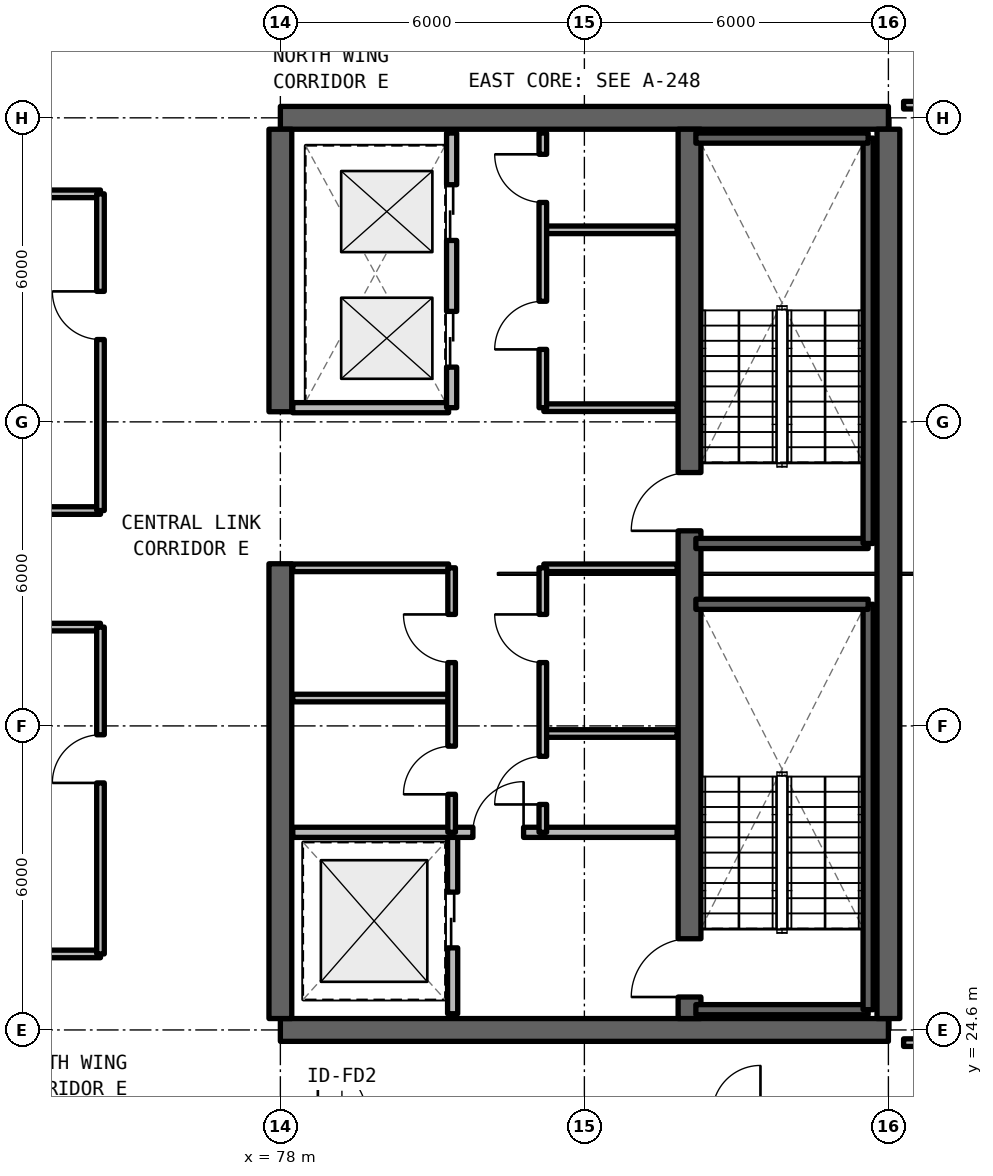
"""IFC4 building model, lengths in metres.
Left out: names, types, materials, properties, quantities, classifications, styles, units other than length and angle.
Written with IfcOpenShell. Run it as: python <this file> out.ifc"""

import sys

from ifc_helpers import new_model, si_unit, direction, frame, frame_2d, origin, place, context, subcontext, project, spatial, rectangle, extrude, element, fill, save


model = new_model("IFC4")
c1 = context("Model", 3, precision=1e-05, world=origin(), true_north=direction((0.0, 1.0)))
c2 = subcontext(c1, "Body", "Model", "MODEL_VIEW")
j1 = project(units=[si_unit("LENGTHUNIT", "METRE"), si_unit("PLANEANGLEUNIT", "RADIAN")], contexts=[c1])
p1 = place(None, origin())
s1 = spatial("IfcSite", under=j1, at=p1, CompositionType="ELEMENT")
p2 = place(p1, origin())
s2 = spatial("IfcBuilding", under=s1, at=p2, CompositionType="ELEMENT")
p3 = place(p2, frame((0.0, 0.0, 249.81)))
s3 = spatial("IfcBuildingStorey", under=s2, at=p3, CompositionType="ELEMENT", Elevation=249.81)
for number, where, z_axis, x_axis in (
    (1, (78.0, 24.6, 0.0), (0.0, 0.0, 1.0), (1.0, 0.0, 0.0)),
    (2, (90.0, 42.6, 0.0), (0.0, 0.0, 1.0), (-1.0, 0.0, 0.0)),
):
    element("IfcWall", number, at=place(p3, frame(where, z_axis=z_axis, x_axis=x_axis)), inside=s3, PredefinedType="SHEAR", context=c2, shape_type="SweptSolid", body=[
        extrude(rectangle(XDim=12.0, YDim=0.45, at=frame_2d((6.0, 0.0))), origin(), (0.0, 0.0, 1.0), 3.63),
    ])
p4 = place(p3, frame((90.0, 24.825, 0.0), z_axis=(0.0, 0.0, 1.0), x_axis=(0.0, 1.0, 0.0)))
e3 = element("IfcWall", 3, at=p4, inside=s3, PredefinedType="SHEAR", context=c2, shape_type="SweptSolid", body=[
    extrude(rectangle(XDim=17.55, YDim=0.45, at=frame_2d((8.775, 0.0))), origin(), (0.0, 0.0, 1.0), 3.63),
])
p5 = place(p3, frame((78.0, 24.825, 0.0), z_axis=(0.0, 0.0, 1.0), x_axis=(0.0, 1.0, 0.0)))
e4 = element("IfcWall", 4, at=p5, inside=s3, PredefinedType="SHEAR", context=c2, shape_type="SweptSolid", body=[
    extrude(rectangle(XDim=8.975, YDim=0.45, at=frame_2d((4.488, 0.0))), origin(), (0.0, 0.0, 1.0), 3.63),
])
p6 = place(p3, frame((78.0, 36.8, 0.0), z_axis=(0.0, 0.0, 1.0), x_axis=(0.0, 1.0, 0.0)))
e5 = element("IfcWall", 5, at=p6, inside=s3, PredefinedType="SHEAR", context=c2, shape_type="SweptSolid", body=[
    extrude(rectangle(XDim=5.575, YDim=0.45, at=frame_2d((2.788, 0.0))), origin(), (0.0, 0.0, 1.0), 3.63),
])
p7 = place(p3, frame((86.075, 24.825, 0.0), z_axis=(0.0, 0.0, 1.0), x_axis=(0.0, 1.0, 0.0)))
e6 = element("IfcWall", 6, at=p7, inside=s3, PredefinedType="SHEAR", context=c2, shape_type="SweptSolid", body=[
    extrude(rectangle(XDim=17.55, YDim=0.45, at=frame_2d((8.775, 0.0))), origin(), (0.0, 0.0, 1.0), 3.63),
])
p8 = place(p7, frame((0.425, 0.0, 0.0)))
e7 = element("IfcOpeningElement", 7, at=p8, cuts=e6, PredefinedType="OPENING", context=c2, shape_type="SweptSolid", body=[
    extrude(rectangle(XDim=1.15, YDim=2.15, at=frame_2d((0.575, 1.075))), frame((0.0, 0.235, 0.0), z_axis=(0.0, -1.0, 0.0), x_axis=(1.0, 0.0, 0.0)), (0.0, 0.0, 1.0), 0.47),
])
p9 = place(p7, frame((9.625, 0.0, 0.0)))
e8 = element("IfcOpeningElement", 8, at=p9, cuts=e6, PredefinedType="OPENING", context=c2, shape_type="SweptSolid", body=[
    extrude(rectangle(XDim=1.15, YDim=2.15, at=frame_2d((0.575, 1.075))), frame((0.0, 0.235, 0.0), z_axis=(0.0, -1.0, 0.0), x_axis=(1.0, 0.0, 0.0)), (0.0, 0.0, 1.0), 0.47),
])
p10 = place(p3, frame((81.4, 24.92, 0.0), z_axis=(0.0, 0.0, 1.0), x_axis=(0.0, 1.0, 0.0)))
e9 = element("IfcWall", 9, at=p10, inside=s3, PredefinedType="SOLIDWALL", context=c2, shape_type="SweptSolid", body=[
    extrude(rectangle(XDim=3.58, YDim=0.2, at=frame_2d((1.79, 0.0))), origin(), (0.0, 0.0, 1.0), 2.63),
])
p11 = place(p10, frame((1.3, 0.0, 0.0)))
e10 = element("IfcOpeningElement", 10, at=p11, cuts=e9, PredefinedType="OPENING", context=c2, shape_type="SweptSolid", body=[
    extrude(rectangle(XDim=1.1, YDim=2.2, at=frame_2d((0.55, 1.1))), frame((0.0, 0.11, 0.0), z_axis=(0.0, -1.0, 0.0), x_axis=(1.0, 0.0, 0.0)), (0.0, 0.0, 1.0), 0.22),
])
p12 = place(p3, frame((78.245, 28.5, 0.0), z_axis=(0.0, 0.0, 1.0), x_axis=(1.0, 0.0, 0.0)))
e11 = element("IfcWall", 11, at=p12, inside=s3, PredefinedType="SOLIDWALL", context=c2, shape_type="SweptSolid", body=[
    extrude(rectangle(XDim=7.585, YDim=0.2, at=frame_2d((3.792, 0.0))), origin(), (0.0, 0.0, 1.0), 2.63),
])
p13 = place(p12, frame((3.555, 0.0, 0.0)))
e12 = element("IfcOpeningElement", 12, at=p13, cuts=e11, PredefinedType="OPENING", context=c2, shape_type="SweptSolid", body=[
    extrude(rectangle(XDim=1.0, YDim=2.15, at=frame_2d((0.5, 1.075))), frame((0.0, 0.11, 0.0), z_axis=(0.0, -1.0, 0.0), x_axis=(1.0, 0.0, 0.0)), (0.0, 0.0, 1.0), 0.22),
])
for number, where, z_axis, x_axis in (
    (13, (83.2, 30.45, 0.0), (0.0, 0.0, 1.0), (1.0, 0.0, 0.0)),
    (14, (83.2, 33.72, 0.0), (0.0, 0.0, 1.0), (1.0, 0.0, 0.0)),
):
    element("IfcWall", number, at=place(p3, frame(where, z_axis=z_axis, x_axis=x_axis)), inside=s3, PredefinedType="SOLIDWALL", context=c2, shape_type="SweptSolid", body=[
        extrude(rectangle(XDim=2.63, YDim=0.15, at=frame_2d((1.315, 0.0))), origin(), (0.0, 0.0, 1.0), 2.63),
    ])
p14 = place(p3, frame((83.18, 28.5, 0.0), z_axis=(0.0, 0.0, 1.0), x_axis=(0.0, 1.0, 0.0)))
e15 = element("IfcWall", 15, at=p14, inside=s3, PredefinedType="SOLIDWALL", context=c2, shape_type="SweptSolid", body=[
    extrude(rectangle(XDim=5.22, YDim=0.15, at=frame_2d((2.61, 0.0))), origin(), (0.0, 0.0, 1.0), 2.63),
])
p15 = place(p14, frame((0.55, 0.0, 0.0)))
e16 = element("IfcOpeningElement", 16, at=p15, cuts=e15, PredefinedType="OPENING", context=c2, shape_type="SweptSolid", body=[
    extrude(rectangle(XDim=0.95, YDim=2.15, at=frame_2d((0.475, 1.075))), frame((0.0, 0.085, 0.0), z_axis=(0.0, -1.0, 0.0), x_axis=(1.0, 0.0, 0.0)), (0.0, 0.0, 1.0), 0.17),
])
p16 = place(p14, frame((3.35, 0.0, 0.0)))
e17 = element("IfcOpeningElement", 17, at=p16, cuts=e15, PredefinedType="OPENING", context=c2, shape_type="SweptSolid", body=[
    extrude(rectangle(XDim=0.95, YDim=2.15, at=frame_2d((0.475, 1.075))), frame((0.0, 0.085, 0.0), z_axis=(0.0, -1.0, 0.0), x_axis=(1.0, 0.0, 0.0)), (0.0, 0.0, 1.0), 0.17),
])
for number, where, z_axis, x_axis in (
    (18, (78.245, 31.15, 0.0), (0.0, 0.0, 1.0), (1.0, 0.0, 0.0)),
    (19, (78.245, 33.72, 0.0), (0.0, 0.0, 1.0), (1.0, 0.0, 0.0)),
):
    element("IfcWall", number, at=place(p3, frame(where, z_axis=z_axis, x_axis=x_axis)), inside=s3, PredefinedType="SOLIDWALL", context=c2, shape_type="SweptSolid", body=[
        extrude(rectangle(XDim=3.075, YDim=0.15, at=frame_2d((1.538, 0.0))), origin(), (0.0, 0.0, 1.0), 2.63),
    ])
p17 = place(p3, frame((81.38, 28.5, 0.0), z_axis=(0.0, 0.0, 1.0), x_axis=(0.0, 1.0, 0.0)))
e20 = element("IfcWall", 20, at=p17, inside=s3, PredefinedType="SOLIDWALL", context=c2, shape_type="SweptSolid", body=[
    extrude(rectangle(XDim=5.22, YDim=0.15, at=frame_2d((2.61, 0.0))), origin(), (0.0, 0.0, 1.0), 2.63),
])
p18 = place(p17, frame((0.75, 0.0, 0.0)))
e21 = element("IfcOpeningElement", 21, at=p18, cuts=e20, PredefinedType="OPENING", context=c2, shape_type="SweptSolid", body=[
    extrude(rectangle(XDim=0.95, YDim=2.15, at=frame_2d((0.475, 1.075))), frame((0.0, 0.085, 0.0), z_axis=(0.0, -1.0, 0.0), x_axis=(1.0, 0.0, 0.0)), (0.0, 0.0, 1.0), 0.17),
])
p19 = place(p17, frame((3.35, 0.0, 0.0)))
e22 = element("IfcOpeningElement", 22, at=p19, cuts=e20, PredefinedType="OPENING", context=c2, shape_type="SweptSolid", body=[
    extrude(rectangle(XDim=0.95, YDim=2.15, at=frame_2d((0.475, 1.075))), frame((0.0, 0.085, 0.0), z_axis=(0.0, -1.0, 0.0), x_axis=(1.0, 0.0, 0.0)), (0.0, 0.0, 1.0), 0.17),
])
for number, where, z_axis, x_axis in (
    (23, (83.2, 36.88, 0.0), (0.0, 0.0, 1.0), (1.0, 0.0, 0.0)),
    (24, (83.2, 40.39, 0.0), (0.0, 0.0, 1.0), (1.0, 0.0, 0.0)),
):
    element("IfcWall", number, at=place(p3, frame(where, z_axis=z_axis, x_axis=x_axis)), inside=s3, PredefinedType="SOLIDWALL", context=c2, shape_type="SweptSolid", body=[
        extrude(rectangle(XDim=2.63, YDim=0.15, at=frame_2d((1.315, 0.0))), origin(), (0.0, 0.0, 1.0), 2.63),
    ])
p20 = place(p3, frame((83.18, 36.88, 0.0), z_axis=(0.0, 0.0, 1.0), x_axis=(0.0, 1.0, 0.0)))
e25 = element("IfcWall", 25, at=p20, inside=s3, PredefinedType="SOLIDWALL", context=c2, shape_type="SweptSolid", body=[
    extrude(rectangle(XDim=5.42, YDim=0.15, at=frame_2d((2.71, 0.0))), origin(), (0.0, 0.0, 1.0), 2.63),
])
p21 = place(p20, frame((1.15, 0.0, 0.0)))
e26 = element("IfcOpeningElement", 26, at=p21, cuts=e25, PredefinedType="OPENING", context=c2, shape_type="SweptSolid", body=[
    extrude(rectangle(XDim=0.95, YDim=2.15, at=frame_2d((0.475, 1.075))), frame((0.0, 0.085, 0.0), z_axis=(0.0, -1.0, 0.0), x_axis=(1.0, 0.0, 0.0)), (0.0, 0.0, 1.0), 0.17),
])
p22 = place(p20, frame((4.05, 0.0, 0.0)))
e27 = element("IfcOpeningElement", 27, at=p22, cuts=e25, PredefinedType="OPENING", context=c2, shape_type="SweptSolid", body=[
    extrude(rectangle(XDim=0.95, YDim=2.15, at=frame_2d((0.475, 1.075))), frame((0.0, 0.085, 0.0), z_axis=(0.0, -1.0, 0.0), x_axis=(1.0, 0.0, 0.0)), (0.0, 0.0, 1.0), 0.17),
])
p23 = place(p3, frame((78.245, 36.88, 0.0), z_axis=(0.0, 0.0, 1.0), x_axis=(1.0, 0.0, 0.0)))
e28 = element("IfcWall", 28, at=p23, inside=s3, PredefinedType="SOLIDWALL", context=c2, shape_type="SweptSolid", body=[
    extrude(rectangle(XDim=3.075, YDim=0.2, at=frame_2d((1.538, 0.0))), origin(), (0.0, 0.0, 1.0), 2.63),
])
p24 = place(p3, frame((81.38, 36.88, 0.0), z_axis=(0.0, 0.0, 1.0), x_axis=(0.0, 1.0, 0.0)))
e29 = element("IfcWall", 29, at=p24, inside=s3, PredefinedType="SOLIDWALL", context=c2, shape_type="SweptSolid", body=[
    extrude(rectangle(XDim=5.42, YDim=0.2, at=frame_2d((2.71, 0.0))), origin(), (0.0, 0.0, 1.0), 2.63),
])
p25 = place(p24, frame((0.8, 0.0, 0.0)))
e30 = element("IfcOpeningElement", 30, at=p25, cuts=e29, PredefinedType="OPENING", context=c2, shape_type="SweptSolid", body=[
    extrude(rectangle(XDim=1.1, YDim=2.2, at=frame_2d((0.55, 1.1))), frame((0.0, 0.11, 0.0), z_axis=(0.0, -1.0, 0.0), x_axis=(1.0, 0.0, 0.0)), (0.0, 0.0, 1.0), 0.22),
])
p26 = place(p24, frame((3.3, 0.0, 0.0)))
e31 = element("IfcOpeningElement", 31, at=p26, cuts=e29, PredefinedType="OPENING", context=c2, shape_type="SweptSolid", body=[
    extrude(rectangle(XDim=1.1, YDim=2.2, at=frame_2d((0.55, 1.1))), frame((0.0, 0.11, 0.0), z_axis=(0.0, -1.0, 0.0), x_axis=(1.0, 0.0, 0.0)), (0.0, 0.0, 1.0), 0.22),
])
p27 = place(p3, frame((90.3, 24.35, 0.0), z_axis=(0.0, 0.0, 1.0), x_axis=(1.0, 0.0, 0.0)))
e32 = element("IfcWall", 32, at=p27, inside=s3, PredefinedType="SOLIDWALL", context=c2, shape_type="SweptSolid", body=[
    extrude(rectangle(XDim=8.52, YDim=0.15, at=frame_2d((4.26, 0.0))), origin(), (0.0, 0.0, 1.0), 2.63),
])
p28 = place(p27, frame((0.975, 0.0, 0.0)))
e33 = element("IfcOpeningElement", 33, at=p28, cuts=e32, PredefinedType="OPENING", context=c2, shape_type="SweptSolid", body=[
    extrude(rectangle(XDim=0.95, YDim=2.15, at=frame_2d((0.475, 1.075))), frame((0.0, 0.085, 0.0), z_axis=(0.0, -1.0, 0.0), x_axis=(1.0, 0.0, 0.0)), (0.0, 0.0, 1.0), 0.17),
])
p29 = place(p3, frame((90.3, 42.85, 0.0), z_axis=(0.0, 0.0, 1.0), x_axis=(1.0, 0.0, 0.0)))
e34 = element("IfcWall", 34, at=p29, inside=s3, PredefinedType="SOLIDWALL", context=c2, shape_type="SweptSolid", body=[
    extrude(rectangle(XDim=8.52, YDim=0.15, at=frame_2d((4.26, 0.0))), origin(), (0.0, 0.0, 1.0), 2.63),
])
for number, where, z_axis, x_axis in (
    (35, (66.0, 26.1, 0.0), (0.0, 0.0, 1.0), (1.0, 0.0, 0.0)),
    (36, (66.0, 32.55, 0.0), (0.0, 0.0, 1.0), (1.0, 0.0, 0.0)),
):
    element("IfcWall", number, at=place(p3, frame(where, z_axis=z_axis, x_axis=x_axis)), inside=s3, PredefinedType="SOLIDWALL", context=c2, shape_type="SweptSolid", body=[
        extrude(rectangle(XDim=8.45, YDim=0.15, at=frame_2d((4.225, 0.0))), origin(), (0.0, 0.0, 1.0), 2.63),
    ])
p30 = place(p3, frame((74.45, 26.1, 0.0), z_axis=(0.0, 0.0, 1.0), x_axis=(0.0, 1.0, 0.0)))
e37 = element("IfcWall", 37, at=p30, inside=s3, PredefinedType="SOLIDWALL", context=c2, shape_type="SweptSolid", body=[
    extrude(rectangle(XDim=6.45, YDim=0.15, at=frame_2d((3.225, 0.0))), origin(), (0.0, 0.0, 1.0), 2.63),
])
p31 = place(p30, frame((3.375, 0.0, 0.0)))
e38 = element("IfcOpeningElement", 38, at=p31, cuts=e37, PredefinedType="OPENING", context=c2, shape_type="SweptSolid", body=[
    extrude(rectangle(XDim=0.95, YDim=2.15, at=frame_2d((0.475, 1.075))), frame((0.0, 0.085, 0.0), z_axis=(0.0, -1.0, 0.0), x_axis=(1.0, 0.0, 0.0)), (0.0, 0.0, 1.0), 0.17),
])
for number, where, z_axis, x_axis in (
    (39, (66.0, 34.85, 0.0), (0.0, 0.0, 1.0), (1.0, 0.0, 0.0)),
    (40, (66.0, 41.1, 0.0), (0.0, 0.0, 1.0), (1.0, 0.0, 0.0)),
):
    element("IfcWall", number, at=place(p3, frame(where, z_axis=z_axis, x_axis=x_axis)), inside=s3, PredefinedType="SOLIDWALL", context=c2, shape_type="SweptSolid", body=[
        extrude(rectangle(XDim=8.45, YDim=0.15, at=frame_2d((4.225, 0.0))), origin(), (0.0, 0.0, 1.0), 2.63),
    ])
p32 = place(p3, frame((74.45, 34.85, 0.0), z_axis=(0.0, 0.0, 1.0), x_axis=(0.0, 1.0, 0.0)))
e41 = element("IfcWall", 41, at=p32, inside=s3, PredefinedType="SOLIDWALL", context=c2, shape_type="SweptSolid", body=[
    extrude(rectangle(XDim=6.25, YDim=0.15, at=frame_2d((3.125, 0.0))), origin(), (0.0, 0.0, 1.0), 2.63),
])
p33 = place(p32, frame((3.375, 0.0, 0.0)))
e42 = element("IfcOpeningElement", 42, at=p33, cuts=e41, PredefinedType="OPENING", context=c2, shape_type="SweptSolid", body=[
    extrude(rectangle(XDim=0.95, YDim=2.15, at=frame_2d((0.475, 1.075))), frame((0.0, 0.085, 0.0), z_axis=(0.0, -1.0, 0.0), x_axis=(1.0, 0.0, 0.0)), (0.0, 0.0, 1.0), 0.17),
])
p34 = place(p3, frame((86.2, 25.0, 0.0), z_axis=(0.0, 0.0, 1.0), x_axis=(1.0, 0.0, 0.0)))
e43 = element("IfcWall", 43, at=p34, inside=s3, PredefinedType="SOLIDWALL", context=c2, shape_type="SweptSolid", body=[
    extrude(rectangle(XDim=3.4, YDim=0.2, at=frame_2d((1.7, 0.0))), origin(), (0.0, 0.0, 1.0), 3.63),
])
p35 = place(p3, frame((89.6, 25.0, 0.0), z_axis=(0.0, 0.0, 1.0), x_axis=(0.0, 1.0, 0.0)))
e44 = element("IfcWall", 44, at=p35, inside=s3, PredefinedType="SOLIDWALL", context=c2, shape_type="SweptSolid", body=[
    extrude(rectangle(XDim=8.0, YDim=0.2, at=frame_2d((4.0, 0.0))), origin(), (0.0, 0.0, 1.0), 3.63),
])
for number, where, z_axis, x_axis in (
    (45, (89.6, 33.0, 0.0), (0.0, 0.0, 1.0), (-1.0, 0.0, 0.0)),
    (46, (86.2, 34.2, 0.0), (0.0, 0.0, 1.0), (1.0, 0.0, 0.0)),
):
    element("IfcWall", number, at=place(p3, frame(where, z_axis=z_axis, x_axis=x_axis)), inside=s3, PredefinedType="SOLIDWALL", context=c2, shape_type="SweptSolid", body=[
        extrude(rectangle(XDim=3.4, YDim=0.2, at=frame_2d((1.7, 0.0))), origin(), (0.0, 0.0, 1.0), 3.63),
    ])
p36 = place(p3, frame((89.6, 34.2, 0.0), z_axis=(0.0, 0.0, 1.0), x_axis=(0.0, 1.0, 0.0)))
e47 = element("IfcWall", 47, at=p36, inside=s3, PredefinedType="SOLIDWALL", context=c2, shape_type="SweptSolid", body=[
    extrude(rectangle(XDim=8.0, YDim=0.2, at=frame_2d((4.0, 0.0))), origin(), (0.0, 0.0, 1.0), 3.63),
])
p37 = place(p3, frame((89.6, 42.2, 0.0), z_axis=(0.0, 0.0, 1.0), x_axis=(-1.0, 0.0, 0.0)))
e48 = element("IfcWall", 48, at=p37, inside=s3, PredefinedType="SOLIDWALL", context=c2, shape_type="SweptSolid", body=[
    extrude(rectangle(XDim=3.4, YDim=0.2, at=frame_2d((1.7, 0.0))), origin(), (0.0, 0.0, 1.0), 3.63),
])
p38 = place(p11, origin())
e49 = element("IfcDoor", 49, at=p38, inside=s3, OperationType="SLIDING_TO_LEFT", PredefinedType="DOOR", context=c2, shape_type="SweptSolid", body=[
    extrude(rectangle(XDim=1.1, YDim=2.2, at=frame_2d((0.55, 1.1))), frame((0.0, 0.025, 0.0), z_axis=(0.0, -1.0, 0.0), x_axis=(1.0, 0.0, 0.0)), (0.0, 0.0, 1.0), 0.05),
])
fill(e10, e49)
p39 = place(p13, origin())
e50 = element("IfcDoor", 50, at=p39, inside=s3, OperationType="SINGLE_SWING_RIGHT", PredefinedType="DOOR", context=c2, shape_type="SweptSolid", body=[
    extrude(rectangle(XDim=1.0, YDim=2.15, at=frame_2d((0.5, 1.075))), frame((0.0, 0.025, 0.0), z_axis=(0.0, -1.0, 0.0), x_axis=(1.0, 0.0, 0.0)), (0.0, 0.0, 1.0), 0.05),
])
fill(e12, e50)
p40 = place(p15, origin())
e51 = element("IfcDoor", 51, at=p40, inside=s3, OperationType="SINGLE_SWING_LEFT", PredefinedType="DOOR", context=c2, shape_type="SweptSolid", body=[
    extrude(rectangle(XDim=0.95, YDim=2.15, at=frame_2d((0.475, 1.075))), frame((0.0, 0.025, 0.0), z_axis=(0.0, -1.0, 0.0), x_axis=(1.0, 0.0, 0.0)), (0.0, 0.0, 1.0), 0.05),
])
fill(e16, e51)
p41 = place(p16, origin())
e52 = element("IfcDoor", 52, at=p41, inside=s3, OperationType="SINGLE_SWING_RIGHT", PredefinedType="DOOR", context=c2, shape_type="SweptSolid", body=[
    extrude(rectangle(XDim=0.95, YDim=2.15, at=frame_2d((0.475, 1.075))), frame((0.0, 0.025, 0.0), z_axis=(0.0, -1.0, 0.0), x_axis=(1.0, 0.0, 0.0)), (0.0, 0.0, 1.0), 0.05),
])
fill(e17, e52)
p42 = place(p18, origin())
e53 = element("IfcDoor", 53, at=p42, inside=s3, OperationType="SINGLE_SWING_LEFT", PredefinedType="DOOR", context=c2, shape_type="SweptSolid", body=[
    extrude(rectangle(XDim=0.95, YDim=2.15, at=frame_2d((0.475, 1.075))), frame((0.0, 0.025, 0.0), z_axis=(0.0, -1.0, 0.0), x_axis=(1.0, 0.0, 0.0)), (0.0, 0.0, 1.0), 0.05),
])
fill(e21, e53)
p43 = place(p19, origin())
e54 = element("IfcDoor", 54, at=p43, inside=s3, OperationType="SINGLE_SWING_RIGHT", PredefinedType="DOOR", context=c2, shape_type="SweptSolid", body=[
    extrude(rectangle(XDim=0.95, YDim=2.15, at=frame_2d((0.475, 1.075))), frame((0.0, 0.025, 0.0), z_axis=(0.0, -1.0, 0.0), x_axis=(1.0, 0.0, 0.0)), (0.0, 0.0, 1.0), 0.05),
])
fill(e22, e54)
p44 = place(p21, origin())
e55 = element("IfcDoor", 55, at=p44, inside=s3, OperationType="SINGLE_SWING_LEFT", PredefinedType="DOOR", context=c2, shape_type="SweptSolid", body=[
    extrude(rectangle(XDim=0.95, YDim=2.15, at=frame_2d((0.475, 1.075))), frame((0.0, 0.025, 0.0), z_axis=(0.0, -1.0, 0.0), x_axis=(1.0, 0.0, 0.0)), (0.0, 0.0, 1.0), 0.05),
])
fill(e26, e55)
p45 = place(p22, origin())
e56 = element("IfcDoor", 56, at=p45, inside=s3, OperationType="SINGLE_SWING_RIGHT", PredefinedType="DOOR", context=c2, shape_type="SweptSolid", body=[
    extrude(rectangle(XDim=0.95, YDim=2.15, at=frame_2d((0.475, 1.075))), frame((0.0, 0.025, 0.0), z_axis=(0.0, -1.0, 0.0), x_axis=(1.0, 0.0, 0.0)), (0.0, 0.0, 1.0), 0.05),
])
fill(e27, e56)
p46 = place(p25, origin())
e57 = element("IfcDoor", 57, at=p46, inside=s3, OperationType="SLIDING_TO_LEFT", PredefinedType="DOOR", context=c2, shape_type="SweptSolid", body=[
    extrude(rectangle(XDim=1.1, YDim=2.2, at=frame_2d((0.55, 1.1))), frame((0.0, 0.025, 0.0), z_axis=(0.0, -1.0, 0.0), x_axis=(1.0, 0.0, 0.0)), (0.0, 0.0, 1.0), 0.05),
])
fill(e30, e57)
p47 = place(p26, origin())
e58 = element("IfcDoor", 58, at=p47, inside=s3, OperationType="SLIDING_TO_RIGHT", PredefinedType="DOOR", context=c2, shape_type="SweptSolid", body=[
    extrude(rectangle(XDim=1.1, YDim=2.2, at=frame_2d((0.55, 1.1))), frame((0.0, 0.025, 0.0), z_axis=(0.0, -1.0, 0.0), x_axis=(1.0, 0.0, 0.0)), (0.0, 0.0, 1.0), 0.05),
])
fill(e31, e58)
p48 = place(p31, origin())
e59 = element("IfcDoor", 59, at=p48, inside=s3, OperationType="SINGLE_SWING_LEFT", PredefinedType="DOOR", context=c2, shape_type="SweptSolid", body=[
    extrude(rectangle(XDim=0.95, YDim=2.15, at=frame_2d((0.475, 1.075))), frame((0.0, 0.025, 0.0), z_axis=(0.0, -1.0, 0.0), x_axis=(1.0, 0.0, 0.0)), (0.0, 0.0, 1.0), 0.05),
])
fill(e38, e59)
p49 = place(p33, origin())
e60 = element("IfcDoor", 60, at=p49, inside=s3, OperationType="SINGLE_SWING_RIGHT", PredefinedType="DOOR", context=c2, shape_type="SweptSolid", body=[
    extrude(rectangle(XDim=0.95, YDim=2.15, at=frame_2d((0.475, 1.075))), frame((0.0, 0.025, 0.0), z_axis=(0.0, -1.0, 0.0), x_axis=(1.0, 0.0, 0.0)), (0.0, 0.0, 1.0), 0.05),
])
fill(e42, e60)
p50 = place(p8, origin())
e61 = element("IfcDoor", 61, at=p50, inside=s3, OperationType="SINGLE_SWING_LEFT", PredefinedType="DOOR", context=c2, shape_type="SweptSolid", body=[
    extrude(rectangle(XDim=1.15, YDim=2.15, at=frame_2d((0.575, 1.075))), frame((0.0, 0.025, 0.0), z_axis=(0.0, -1.0, 0.0), x_axis=(1.0, 0.0, 0.0)), (0.0, 0.0, 1.0), 0.05),
])
fill(e7, e61)
p51 = place(p9, origin())
e62 = element("IfcDoor", 62, at=p51, inside=s3, OperationType="SINGLE_SWING_RIGHT", PredefinedType="DOOR", context=c2, shape_type="SweptSolid", body=[
    extrude(rectangle(XDim=1.15, YDim=2.15, at=frame_2d((0.575, 1.075))), frame((0.0, 0.025, 0.0), z_axis=(0.0, -1.0, 0.0), x_axis=(1.0, 0.0, 0.0)), (0.0, 0.0, 1.0), 0.05),
])
fill(e8, e62)
save(model, sys.argv[1])
